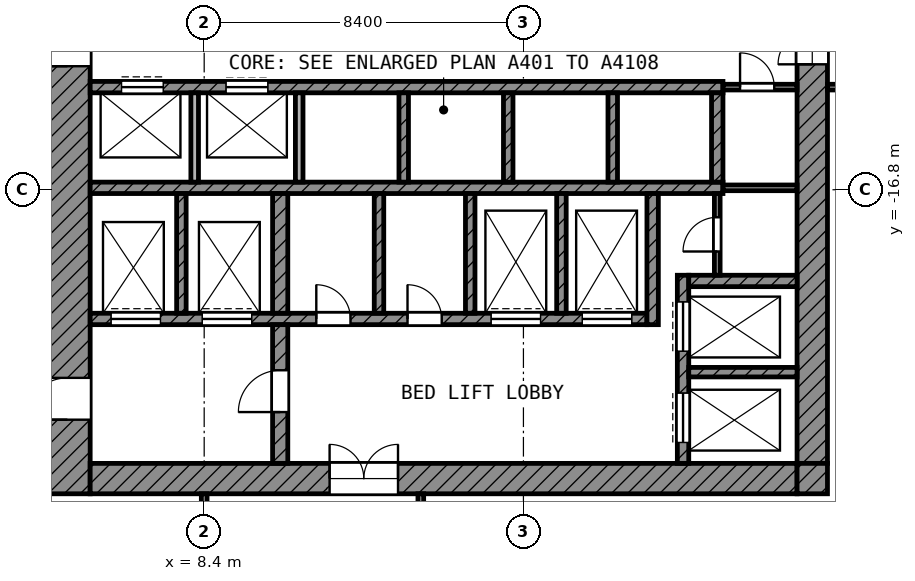
"""IFC4 building model, lengths in metres.
Left out: names, types, materials, properties, quantities, classifications, styles, units other than length and angle.
Written with IfcOpenShell. Run it as: python <this file> out.ifc"""

import sys

from ifc_helpers import new_model, si_unit, direction, frame, frame_2d, origin, place, context, subcontext, project, spatial, rectangle, extrude, element, fill, save


model = new_model("IFC4")
c1 = context("Model", 3, precision=1e-05, world=origin(), true_north=direction((0.0, 1.0)))
c2 = subcontext(c1, "Body", "Model", "MODEL_VIEW")
j1 = project(units=[si_unit("LENGTHUNIT", "METRE"), si_unit("PLANEANGLEUNIT", "RADIAN")], contexts=[c1])
p1 = place(None, origin())
s1 = spatial("IfcSite", under=j1, at=p1, CompositionType="ELEMENT")
p2 = place(p1, origin())
s2 = spatial("IfcBuilding", under=s1, at=p2, CompositionType="ELEMENT")
p3 = place(p2, frame((0.0, 0.0, 260.0)))
s3 = spatial("IfcBuildingStorey", under=s2, at=p3, CompositionType="ELEMENT", Elevation=260.0)
p4 = place(p3, frame((4.8, -24.8, 0.0), z_axis=(0.0, 0.0, 1.0), x_axis=(0.0, 1.0, 0.0)))
e1 = element("IfcWall", 1, at=p4, inside=s3, PredefinedType="SHEAR", context=c2, shape_type="SweptSolid", body=[
    extrude(rectangle(XDim=19.4, YDim=1.2, at=frame_2d((9.7, 0.0))), origin(), (0.0, 0.0, 1.0), 3.6),
])
p5 = place(p4, frame((11.25, 0.0, 0.0)))
e2 = element("IfcOpeningElement", 2, at=p5, cuts=e1, PredefinedType="OPENING", context=c2, shape_type="SweptSolid", body=[
    extrude(rectangle(XDim=1.1, YDim=2.1, at=frame_2d((0.55, 1.05))), frame((0.0, 0.61, 0.0), z_axis=(0.0, -1.0, 0.0), x_axis=(1.0, 0.0, 0.0)), (0.0, 0.0, 1.0), 1.22),
])
p6 = place(p4, frame((1.95, 0.0, 0.0)))
e3 = element("IfcOpeningElement", 3, at=p6, cuts=e1, PredefinedType="OPENING", context=c2, shape_type="SweptSolid", body=[
    extrude(rectangle(XDim=1.1, YDim=2.1, at=frame_2d((0.55, 1.05))), frame((0.0, 0.61, 0.0), z_axis=(0.0, -1.0, 0.0), x_axis=(1.0, 0.0, 0.0)), (0.0, 0.0, 1.0), 1.22),
])
p7 = place(p3, frame((24.4, -24.0, 0.0), z_axis=(0.0, 0.0, 1.0), x_axis=(0.0, 1.0, 0.0)))
e4 = element("IfcWall", 4, at=p7, inside=s3, PredefinedType="SHEAR", context=c2, shape_type="SweptSolid", body=[
    extrude(rectangle(XDim=18.6, YDim=0.8, at=frame_2d((9.3, 0.0))), origin(), (0.0, 0.0, 1.0), 3.6),
])
p8 = place(p7, frame((10.5, 0.0, 0.0)))
e5 = element("IfcOpeningElement", 5, at=p8, cuts=e4, PredefinedType="OPENING", context=c2, shape_type="SweptSolid", body=[
    extrude(rectangle(XDim=1.8, YDim=2.1, at=frame_2d((0.9, 1.05))), frame((0.0, 0.41, 0.0), z_axis=(0.0, -1.0, 0.0), x_axis=(1.0, 0.0, 0.0)), (0.0, 0.0, 1.0), 0.82),
])
p9 = place(p3, frame((5.4, -24.4, 0.0), z_axis=(0.0, 0.0, 1.0), x_axis=(1.0, 0.0, 0.0)))
e6 = element("IfcWall", 6, at=p9, inside=s3, PredefinedType="SHEAR", context=c2, shape_type="SweptSolid", body=[
    extrude(rectangle(XDim=18.6, YDim=0.8, at=frame_2d((9.3, 0.0))), origin(), (0.0, 0.0, 1.0), 3.6),
])
p10 = place(p9, frame((6.3, 0.0, 0.0)))
e7 = element("IfcOpeningElement", 7, at=p10, cuts=e6, PredefinedType="OPENING", context=c2, shape_type="SweptSolid", body=[
    extrude(rectangle(XDim=1.8, YDim=2.1, at=frame_2d((0.9, 1.05))), frame((0.0, 0.41, 0.0), z_axis=(0.0, -1.0, 0.0), x_axis=(1.0, 0.0, 0.0)), (0.0, 0.0, 1.0), 0.82),
])
p11 = place(p3, frame((24.4, -24.8, 0.0), z_axis=(0.0, 0.0, 1.0), x_axis=(0.0, 1.0, 0.0)))
e8 = element("IfcWall", 8, at=p11, inside=s3, PredefinedType="SHEAR", context=c2, shape_type="SweptSolid", body=[
    extrude(rectangle(XDim=0.8, YDim=0.8, at=frame_2d((0.4, 0.0))), origin(), (0.0, 0.0, 1.0), 3.6),
])
p12 = place(p3, frame((5.4, -14.1, 0.0), z_axis=(0.0, 0.0, 1.0), x_axis=(1.0, 0.0, 0.0)))
e9 = element("IfcWall", 9, at=p12, inside=s3, PredefinedType="SHEAR", context=c2, shape_type="SweptSolid", body=[
    extrude(rectangle(XDim=16.65, YDim=0.3, at=frame_2d((8.325, 0.0))), origin(), (0.0, 0.0, 1.0), 3.6),
])
p13 = place(p12, frame((0.825, 0.0, 0.0)))
e10 = element("IfcOpeningElement", 10, at=p13, cuts=e9, PredefinedType="OPENING", context=c2, shape_type="SweptSolid", body=[
    extrude(rectangle(XDim=1.1, YDim=2.1, at=frame_2d((0.55, 1.05))), frame((0.0, 0.16, 0.0), z_axis=(0.0, -1.0, 0.0), x_axis=(1.0, 0.0, 0.0)), (0.0, 0.0, 1.0), 0.32),
])
p14 = place(p12, frame((3.575, 0.0, 0.0)))
e11 = element("IfcOpeningElement", 11, at=p14, cuts=e9, PredefinedType="OPENING", context=c2, shape_type="SweptSolid", body=[
    extrude(rectangle(XDim=1.1, YDim=2.1, at=frame_2d((0.55, 1.05))), frame((0.0, 0.16, 0.0), z_axis=(0.0, -1.0, 0.0), x_axis=(1.0, 0.0, 0.0)), (0.0, 0.0, 1.0), 0.32),
])
p15 = place(p3, frame((5.4, -16.75, 0.0), z_axis=(0.0, 0.0, 1.0), x_axis=(1.0, 0.0, 0.0)))
e12 = element("IfcWall", 12, at=p15, inside=s3, PredefinedType="SHEAR", context=c2, shape_type="SweptSolid", body=[
    extrude(rectangle(XDim=16.65, YDim=0.3, at=frame_2d((8.325, 0.0))), origin(), (0.0, 0.0, 1.0), 3.6),
])
p16 = place(p3, frame((5.4, -20.2, 0.0), z_axis=(0.0, 0.0, 1.0), x_axis=(1.0, 0.0, 0.0)))
e13 = element("IfcWall", 13, at=p16, inside=s3, PredefinedType="SHEAR", context=c2, shape_type="SweptSolid", body=[
    extrude(rectangle(XDim=14.65, YDim=0.3, at=frame_2d((7.325, 0.0))), origin(), (0.0, 0.0, 1.0), 3.6),
])
p17 = place(p16, frame((10.55, 0.0, 0.0)))
e14 = element("IfcOpeningElement", 14, at=p17, cuts=e13, PredefinedType="OPENING", context=c2, shape_type="SweptSolid", body=[
    extrude(rectangle(XDim=1.3, YDim=2.1, at=frame_2d((0.65, 1.05))), frame((0.0, 0.16, 0.0), z_axis=(0.0, -1.0, 0.0), x_axis=(1.0, 0.0, 0.0)), (0.0, 0.0, 1.0), 0.32),
])
p18 = place(p16, frame((12.95, 0.0, 0.0)))
e15 = element("IfcOpeningElement", 15, at=p18, cuts=e13, PredefinedType="OPENING", context=c2, shape_type="SweptSolid", body=[
    extrude(rectangle(XDim=1.3, YDim=2.1, at=frame_2d((0.65, 1.05))), frame((0.0, 0.16, 0.0), z_axis=(0.0, -1.0, 0.0), x_axis=(1.0, 0.0, 0.0)), (0.0, 0.0, 1.0), 0.32),
])
p19 = place(p16, frame((0.55, 0.0, 0.0)))
e16 = element("IfcOpeningElement", 16, at=p19, cuts=e13, PredefinedType="OPENING", context=c2, shape_type="SweptSolid", body=[
    extrude(rectangle(XDim=1.3, YDim=2.1, at=frame_2d((0.65, 1.05))), frame((0.0, 0.16, 0.0), z_axis=(0.0, -1.0, 0.0), x_axis=(1.0, 0.0, 0.0)), (0.0, 0.0, 1.0), 0.32),
])
p20 = place(p16, frame((2.95, 0.0, 0.0)))
e17 = element("IfcOpeningElement", 17, at=p20, cuts=e13, PredefinedType="OPENING", context=c2, shape_type="SweptSolid", body=[
    extrude(rectangle(XDim=1.3, YDim=2.1, at=frame_2d((0.65, 1.05))), frame((0.0, 0.16, 0.0), z_axis=(0.0, -1.0, 0.0), x_axis=(1.0, 0.0, 0.0)), (0.0, 0.0, 1.0), 0.32),
])
p21 = place(p16, frame((5.95, 0.0, 0.0)))
e18 = element("IfcOpeningElement", 18, at=p21, cuts=e13, PredefinedType="OPENING", context=c2, shape_type="SweptSolid", body=[
    extrude(rectangle(XDim=0.9, YDim=2.1, at=frame_2d((0.45, 1.05))), frame((0.0, 0.16, 0.0), z_axis=(0.0, -1.0, 0.0), x_axis=(1.0, 0.0, 0.0)), (0.0, 0.0, 1.0), 0.32),
])
p22 = place(p16, frame((8.35, 0.0, 0.0)))
e19 = element("IfcOpeningElement", 19, at=p22, cuts=e13, PredefinedType="OPENING", context=c2, shape_type="SweptSolid", body=[
    extrude(rectangle(XDim=0.9, YDim=2.1, at=frame_2d((0.45, 1.05))), frame((0.0, 0.16, 0.0), z_axis=(0.0, -1.0, 0.0), x_axis=(1.0, 0.0, 0.0)), (0.0, 0.0, 1.0), 0.32),
])
p23 = place(p3, frame((10.4, -24.0, 0.0), z_axis=(0.0, 0.0, 1.0), x_axis=(0.0, 1.0, 0.0)))
e20 = element("IfcWall", 20, at=p23, inside=s3, PredefinedType="SHEAR", context=c2, shape_type="SweptSolid", body=[
    extrude(rectangle(XDim=3.65, YDim=0.4, at=frame_2d((1.825, 0.0))), origin(), (0.0, 0.0, 1.0), 3.6),
])
p24 = place(p23, frame((1.35, 0.0, 0.0)))
e21 = element("IfcOpeningElement", 21, at=p24, cuts=e20, PredefinedType="OPENING", context=c2, shape_type="SweptSolid", body=[
    extrude(rectangle(XDim=1.1, YDim=2.1, at=frame_2d((0.55, 1.05))), frame((0.0, 0.21, 0.0), z_axis=(0.0, -1.0, 0.0), x_axis=(1.0, 0.0, 0.0)), (0.0, 0.0, 1.0), 0.42),
])
p25 = place(p3, frame((10.4, -20.05, 0.0), z_axis=(0.0, 0.0, 1.0), x_axis=(0.0, 1.0, 0.0)))
e22 = element("IfcWall", 22, at=p25, inside=s3, PredefinedType="SHEAR", context=c2, shape_type="SweptSolid", body=[
    extrude(rectangle(XDim=3.15, YDim=0.4, at=frame_2d((1.575, 0.0))), origin(), (0.0, 0.0, 1.0), 3.6),
])
p26 = place(p3, frame((20.2, -20.35, 0.0), z_axis=(0.0, 0.0, 1.0), x_axis=(0.0, 1.0, 0.0)))
e23 = element("IfcWall", 23, at=p26, inside=s3, PredefinedType="SHEAR", context=c2, shape_type="SweptSolid", body=[
    extrude(rectangle(XDim=3.45, YDim=0.3, at=frame_2d((1.725, 0.0))), origin(), (0.0, 0.0, 1.0), 3.6),
])
p27 = place(p3, frame((21.9, -16.6, 0.0), z_axis=(0.0, 0.0, 1.0), x_axis=(0.0, 1.0, 0.0)))
e24 = element("IfcWall", 24, at=p27, inside=s3, PredefinedType="SHEAR", context=c2, shape_type="SweptSolid", body=[
    extrude(rectangle(XDim=2.35, YDim=0.3, at=frame_2d((1.175, 0.0))), origin(), (0.0, 0.0, 1.0), 3.6),
])
p28 = place(p3, frame((21.15, -19.2, 0.0), z_axis=(0.0, 0.0, 1.0), x_axis=(1.0, 0.0, 0.0)))
e25 = element("IfcWall", 25, at=p28, inside=s3, PredefinedType="SHEAR", context=c2, shape_type="SweptSolid", body=[
    extrude(rectangle(XDim=2.85, YDim=0.3, at=frame_2d((1.425, 0.0))), origin(), (0.0, 0.0, 1.0), 3.6),
])
p29 = place(p3, frame((21.0, -24.0, 0.0), z_axis=(0.0, 0.0, 1.0), x_axis=(0.0, 1.0, 0.0)))
e26 = element("IfcWall", 26, at=p29, inside=s3, PredefinedType="SHEAR", context=c2, shape_type="SweptSolid", body=[
    extrude(rectangle(XDim=4.95, YDim=0.3, at=frame_2d((2.475, 0.0))), origin(), (0.0, 0.0, 1.0), 3.6),
])
p30 = place(p29, frame((2.95, 0.0, 0.0)))
e27 = element("IfcOpeningElement", 27, at=p30, cuts=e26, PredefinedType="OPENING", context=c2, shape_type="SweptSolid", body=[
    extrude(rectangle(XDim=1.3, YDim=2.1, at=frame_2d((0.65, 1.05))), frame((0.0, 0.16, 0.0), z_axis=(0.0, -1.0, 0.0), x_axis=(1.0, 0.0, 0.0)), (0.0, 0.0, 1.0), 0.32),
])
p31 = place(p29, frame((0.55, 0.0, 0.0)))
e28 = element("IfcOpeningElement", 28, at=p31, cuts=e26, PredefinedType="OPENING", context=c2, shape_type="SweptSolid", body=[
    extrude(rectangle(XDim=1.3, YDim=2.1, at=frame_2d((0.65, 1.05))), frame((0.0, 0.16, 0.0), z_axis=(0.0, -1.0, 0.0), x_axis=(1.0, 0.0, 0.0)), (0.0, 0.0, 1.0), 0.32),
])
p32 = place(p3, frame((21.15, -21.6, 0.0), z_axis=(0.0, 0.0, 1.0), x_axis=(1.0, 0.0, 0.0)))
e29 = element("IfcWall", 29, at=p32, inside=s3, PredefinedType="SHEAR", context=c2, shape_type="SweptSolid", body=[
    extrude(rectangle(XDim=2.85, YDim=0.25, at=frame_2d((1.425, 0.0))), origin(), (0.0, 0.0, 1.0), 3.6),
])
for number, where, z_axis, x_axis in (
    (30, (7.8, -20.05, 0.0), (0.0, 0.0, 1.0), (0.0, 1.0, 0.0)),
    (31, (13.0, -20.05, 0.0), (0.0, 0.0, 1.0), (0.0, 1.0, 0.0)),
    (32, (15.4, -20.05, 0.0), (0.0, 0.0, 1.0), (0.0, 1.0, 0.0)),
    (33, (17.8, -20.05, 0.0), (0.0, 0.0, 1.0), (0.0, 1.0, 0.0)),
):
    element("IfcWall", number, at=place(p3, frame(where, z_axis=z_axis, x_axis=x_axis)), inside=s3, PredefinedType="SHEAR", context=c2, shape_type="SweptSolid", body=[
        extrude(rectangle(XDim=3.15, YDim=0.25, at=frame_2d((1.575, 0.0))), origin(), (0.0, 0.0, 1.0), 3.6),
    ])
for number, where, z_axis, x_axis in (
    (34, (8.15, -16.6, 0.0), (0.0, 0.0, 1.0), (0.0, 1.0, 0.0)),
    (35, (10.9, -16.6, 0.0), (0.0, 0.0, 1.0), (0.0, 1.0, 0.0)),
):
    element("IfcWall", number, at=place(p3, frame(where, z_axis=z_axis, x_axis=x_axis)), inside=s3, PredefinedType="PARTITIONING", context=c2, shape_type="SweptSolid", body=[
        extrude(rectangle(XDim=2.35, YDim=0.2, at=frame_2d((1.175, 0.0))), origin(), (0.0, 0.0, 1.0), 3.6),
    ])
for number, where, z_axis, x_axis in (
    (36, (13.65, -16.6, 0.0), (0.0, 0.0, 1.0), (0.0, 1.0, 0.0)),
    (37, (16.4, -16.6, 0.0), (0.0, 0.0, 1.0), (0.0, 1.0, 0.0)),
    (38, (19.15, -16.6, 0.0), (0.0, 0.0, 1.0), (0.0, 1.0, 0.0)),
):
    element("IfcWall", number, at=place(p3, frame(where, z_axis=z_axis, x_axis=x_axis)), inside=s3, PredefinedType="SHEAR", context=c2, shape_type="SweptSolid", body=[
        extrude(rectangle(XDim=2.35, YDim=0.25, at=frame_2d((1.175, 0.0))), origin(), (0.0, 0.0, 1.0), 3.6),
    ])
p33 = place(p3, frame((21.9, -19.05, 0.0), z_axis=(0.0, 0.0, 1.0), x_axis=(0.0, 1.0, 0.0)))
e39 = element("IfcWall", 39, at=p33, inside=s3, PredefinedType="PARTITIONING", context=c2, shape_type="SweptSolid", body=[
    extrude(rectangle(XDim=2.15, YDim=0.15, at=frame_2d((1.075, 0.0))), origin(), (0.0, 0.0, 1.0), 3.6),
])
p34 = place(p33, frame((0.625, 0.0, 0.0)))
e40 = element("IfcOpeningElement", 40, at=p34, cuts=e39, PredefinedType="OPENING", context=c2, shape_type="SweptSolid", body=[
    extrude(rectangle(XDim=0.9, YDim=2.1, at=frame_2d((0.45, 1.05))), frame((0.0, 0.085, 0.0), z_axis=(0.0, -1.0, 0.0), x_axis=(1.0, 0.0, 0.0)), (0.0, 0.0, 1.0), 0.17),
])
p35 = place(p3, frame((22.05, -16.75, 0.0), z_axis=(0.0, 0.0, 1.0), x_axis=(1.0, 0.0, 0.0)))
e41 = element("IfcWall", 41, at=p35, inside=s3, PredefinedType="PARTITIONING", context=c2, shape_type="SweptSolid", body=[
    extrude(rectangle(XDim=1.95, YDim=0.15, at=frame_2d((0.975, 0.0))), origin(), (0.0, 0.0, 1.0), 3.6),
])
p36 = place(p3, frame((22.05, -14.1, 0.0), z_axis=(0.0, 0.0, 1.0), x_axis=(1.0, 0.0, 0.0)))
e42 = element("IfcWall", 42, at=p36, inside=s3, PredefinedType="PARTITIONING", context=c2, shape_type="SweptSolid", body=[
    extrude(rectangle(XDim=1.95, YDim=0.15, at=frame_2d((0.975, 0.0))), origin(), (0.0, 0.0, 1.0), 3.6),
])
p37 = place(p36, frame((0.45, 0.0, 0.0)))
e43 = element("IfcOpeningElement", 43, at=p37, cuts=e42, PredefinedType="OPENING", context=c2, shape_type="SweptSolid", body=[
    extrude(rectangle(XDim=0.9, YDim=2.1, at=frame_2d((0.45, 1.05))), frame((0.0, 0.085, 0.0), z_axis=(0.0, -1.0, 0.0), x_axis=(1.0, 0.0, 0.0)), (0.0, 0.0, 1.0), 0.17),
])
p38 = place(p3, frame((24.8, -14.1, 0.0), z_axis=(0.0, 0.0, 1.0), x_axis=(1.0, 0.0, 0.0)))
e44 = element("IfcWall", 44, at=p38, inside=s3, PredefinedType="PARTITIONING", context=c2, shape_type="SweptSolid", body=[
    extrude(rectangle(XDim=4.525, YDim=0.15, at=frame_2d((2.262, 0.0))), origin(), (0.0, 0.0, 1.0), 3.6),
])
p39 = place(p38, frame((1.75, 0.0, 0.0)))
e45 = element("IfcOpeningElement", 45, at=p39, cuts=e44, PredefinedType="OPENING", context=c2, shape_type="SweptSolid", body=[
    extrude(rectangle(XDim=1.5, YDim=2.1, at=frame_2d((0.75, 1.05))), frame((0.0, 0.085, 0.0), z_axis=(0.0, -1.0, 0.0), x_axis=(1.0, 0.0, 0.0)), (0.0, 0.0, 1.0), 0.17),
])
p40 = place(p3, frame((8.4, -31.907, 0.0), z_axis=(0.0, 0.0, 1.0), x_axis=(0.0, 1.0, 0.0)))
e46 = element("IfcWall", 46, at=p40, inside=s3, PredefinedType="PARTITIONING", context=c2, shape_type="SweptSolid", body=[
    extrude(rectangle(XDim=7.107, YDim=0.15, at=frame_2d((3.553, 0.0))), origin(), (0.0, 0.0, 1.0), 3.6),
])
p41 = place(p3, frame((14.1, -29.325, 0.0), z_axis=(0.0, 0.0, 1.0), x_axis=(0.0, 1.0, 0.0)))
e47 = element("IfcWall", 47, at=p41, inside=s3, PredefinedType="PARTITIONING", context=c2, shape_type="SweptSolid", body=[
    extrude(rectangle(XDim=4.525, YDim=0.15, at=frame_2d((2.262, 0.0))), origin(), (0.0, 0.0, 1.0), 3.6),
])
p42 = place(p13, origin())
e48 = element("IfcDoor", 48, at=p42, inside=s3, OperationType="DOUBLE_DOOR_SLIDING", PredefinedType="DOOR", context=c2, shape_type="SweptSolid", body=[
    extrude(rectangle(XDim=1.1, YDim=2.1, at=frame_2d((0.55, 1.05))), frame((0.0, 0.025, 0.0), z_axis=(0.0, -1.0, 0.0), x_axis=(1.0, 0.0, 0.0)), (0.0, 0.0, 1.0), 0.05),
])
fill(e10, e48)
p43 = place(p14, origin())
e49 = element("IfcDoor", 49, at=p43, inside=s3, OperationType="DOUBLE_DOOR_SLIDING", PredefinedType="DOOR", context=c2, shape_type="SweptSolid", body=[
    extrude(rectangle(XDim=1.1, YDim=2.1, at=frame_2d((0.55, 1.05))), frame((0.0, 0.025, 0.0), z_axis=(0.0, -1.0, 0.0), x_axis=(1.0, 0.0, 0.0)), (0.0, 0.0, 1.0), 0.05),
])
fill(e11, e49)
p44 = place(p30, origin())
e50 = element("IfcDoor", 50, at=p44, inside=s3, OperationType="DOUBLE_DOOR_SLIDING", PredefinedType="DOOR", context=c2, shape_type="SweptSolid", body=[
    extrude(rectangle(XDim=1.3, YDim=2.1, at=frame_2d((0.65, 1.05))), frame((0.0, 0.025, 0.0), z_axis=(0.0, -1.0, 0.0), x_axis=(1.0, 0.0, 0.0)), (0.0, 0.0, 1.0), 0.05),
])
fill(e27, e50)
p45 = place(p31, origin())
e51 = element("IfcDoor", 51, at=p45, inside=s3, OperationType="DOUBLE_DOOR_SLIDING", PredefinedType="DOOR", context=c2, shape_type="SweptSolid", body=[
    extrude(rectangle(XDim=1.3, YDim=2.1, at=frame_2d((0.65, 1.05))), frame((0.0, 0.025, 0.0), z_axis=(0.0, -1.0, 0.0), x_axis=(1.0, 0.0, 0.0)), (0.0, 0.0, 1.0), 0.05),
])
fill(e28, e51)
p46 = place(p17, origin())
e52 = element("IfcDoor", 52, at=p46, inside=s3, OperationType="DOUBLE_DOOR_SLIDING", PredefinedType="DOOR", context=c2, shape_type="SweptSolid", body=[
    extrude(rectangle(XDim=1.3, YDim=2.1, at=frame_2d((0.65, 1.05))), frame((0.0, 0.025, 0.0), z_axis=(0.0, -1.0, 0.0), x_axis=(1.0, 0.0, 0.0)), (0.0, 0.0, 1.0), 0.05),
])
fill(e14, e52)
p47 = place(p18, origin())
e53 = element("IfcDoor", 53, at=p47, inside=s3, OperationType="DOUBLE_DOOR_SLIDING", PredefinedType="DOOR", context=c2, shape_type="SweptSolid", body=[
    extrude(rectangle(XDim=1.3, YDim=2.1, at=frame_2d((0.65, 1.05))), frame((0.0, 0.025, 0.0), z_axis=(0.0, -1.0, 0.0), x_axis=(1.0, 0.0, 0.0)), (0.0, 0.0, 1.0), 0.05),
])
fill(e15, e53)
p48 = place(p19, origin())
e54 = element("IfcDoor", 54, at=p48, inside=s3, OperationType="DOUBLE_DOOR_SLIDING", PredefinedType="DOOR", context=c2, shape_type="SweptSolid", body=[
    extrude(rectangle(XDim=1.3, YDim=2.1, at=frame_2d((0.65, 1.05))), frame((0.0, 0.025, 0.0), z_axis=(0.0, -1.0, 0.0), x_axis=(1.0, 0.0, 0.0)), (0.0, 0.0, 1.0), 0.05),
])
fill(e16, e54)
p49 = place(p20, origin())
e55 = element("IfcDoor", 55, at=p49, inside=s3, OperationType="DOUBLE_DOOR_SLIDING", PredefinedType="DOOR", context=c2, shape_type="SweptSolid", body=[
    extrude(rectangle(XDim=1.3, YDim=2.1, at=frame_2d((0.65, 1.05))), frame((0.0, 0.025, 0.0), z_axis=(0.0, -1.0, 0.0), x_axis=(1.0, 0.0, 0.0)), (0.0, 0.0, 1.0), 0.05),
])
fill(e17, e55)
p50 = place(p5, origin())
e56 = element("IfcDoor", 56, at=p50, inside=s3, OperationType="SINGLE_SWING_LEFT", PredefinedType="DOOR", context=c2, shape_type="SweptSolid", body=[
    extrude(rectangle(XDim=1.1, YDim=2.1, at=frame_2d((0.55, 1.05))), frame((0.0, 0.025, 0.0), z_axis=(0.0, -1.0, 0.0), x_axis=(1.0, 0.0, 0.0)), (0.0, 0.0, 1.0), 0.05),
])
fill(e2, e56)
p51 = place(p6, origin())
e57 = element("IfcDoor", 57, at=p51, inside=s3, OperationType="SINGLE_SWING_LEFT", PredefinedType="DOOR", context=c2, shape_type="SweptSolid", body=[
    extrude(rectangle(XDim=1.1, YDim=2.1, at=frame_2d((0.55, 1.05))), frame((0.0, 0.025, 0.0), z_axis=(0.0, -1.0, 0.0), x_axis=(1.0, 0.0, 0.0)), (0.0, 0.0, 1.0), 0.05),
])
fill(e3, e57)
p52 = place(p24, origin())
e58 = element("IfcDoor", 58, at=p52, inside=s3, OperationType="SINGLE_SWING_LEFT", PredefinedType="DOOR", context=c2, shape_type="SweptSolid", body=[
    extrude(rectangle(XDim=1.1, YDim=2.1, at=frame_2d((0.55, 1.05))), frame((0.0, 0.025, 0.0), z_axis=(0.0, -1.0, 0.0), x_axis=(1.0, 0.0, 0.0)), (0.0, 0.0, 1.0), 0.05),
])
fill(e21, e58)
p53 = place(p8, origin())
e59 = element("IfcDoor", 59, at=p53, inside=s3, OperationType="DOUBLE_DOOR_SINGLE_SWING", PredefinedType="DOOR", context=c2, shape_type="SweptSolid", body=[
    extrude(rectangle(XDim=1.8, YDim=2.1, at=frame_2d((0.9, 1.05))), frame((0.0, 0.025, 0.0), z_axis=(0.0, -1.0, 0.0), x_axis=(1.0, 0.0, 0.0)), (0.0, 0.0, 1.0), 0.05),
])
fill(e5, e59)
p54 = place(p10, origin())
e60 = element("IfcDoor", 60, at=p54, inside=s3, OperationType="DOUBLE_DOOR_SINGLE_SWING", PredefinedType="DOOR", context=c2, shape_type="SweptSolid", body=[
    extrude(rectangle(XDim=1.8, YDim=2.1, at=frame_2d((0.9, 1.05))), frame((0.0, 0.025, 0.0), z_axis=(0.0, -1.0, 0.0), x_axis=(1.0, 0.0, 0.0)), (0.0, 0.0, 1.0), 0.05),
])
fill(e7, e60)
p55 = place(p37, origin())
e61 = element("IfcDoor", 61, at=p55, inside=s3, OperationType="SINGLE_SWING_LEFT", PredefinedType="DOOR", context=c2, shape_type="SweptSolid", body=[
    extrude(rectangle(XDim=0.9, YDim=2.1, at=frame_2d((0.45, 1.05))), frame((0.0, 0.025, 0.0), z_axis=(0.0, -1.0, 0.0), x_axis=(1.0, 0.0, 0.0)), (0.0, 0.0, 1.0), 0.05),
])
fill(e43, e61)
p56 = place(p34, origin())
e62 = element("IfcDoor", 62, at=p56, inside=s3, OperationType="SINGLE_SWING_LEFT", PredefinedType="DOOR", context=c2, shape_type="SweptSolid", body=[
    extrude(rectangle(XDim=0.9, YDim=2.1, at=frame_2d((0.45, 1.05))), frame((0.0, 0.025, 0.0), z_axis=(0.0, -1.0, 0.0), x_axis=(1.0, 0.0, 0.0)), (0.0, 0.0, 1.0), 0.05),
])
fill(e40, e62)
p57 = place(p21, origin())
e63 = element("IfcDoor", 63, at=p57, inside=s3, OperationType="SINGLE_SWING_LEFT", PredefinedType="DOOR", context=c2, shape_type="SweptSolid", body=[
    extrude(rectangle(XDim=0.9, YDim=2.1, at=frame_2d((0.45, 1.05))), frame((0.0, 0.025, 0.0), z_axis=(0.0, -1.0, 0.0), x_axis=(1.0, 0.0, 0.0)), (0.0, 0.0, 1.0), 0.05),
])
fill(e18, e63)
p58 = place(p22, origin())
e64 = element("IfcDoor", 64, at=p58, inside=s3, OperationType="SINGLE_SWING_LEFT", PredefinedType="DOOR", context=c2, shape_type="SweptSolid", body=[
    extrude(rectangle(XDim=0.9, YDim=2.1, at=frame_2d((0.45, 1.05))), frame((0.0, 0.025, 0.0), z_axis=(0.0, -1.0, 0.0), x_axis=(1.0, 0.0, 0.0)), (0.0, 0.0, 1.0), 0.05),
])
fill(e19, e64)
save(model, sys.argv[1])
